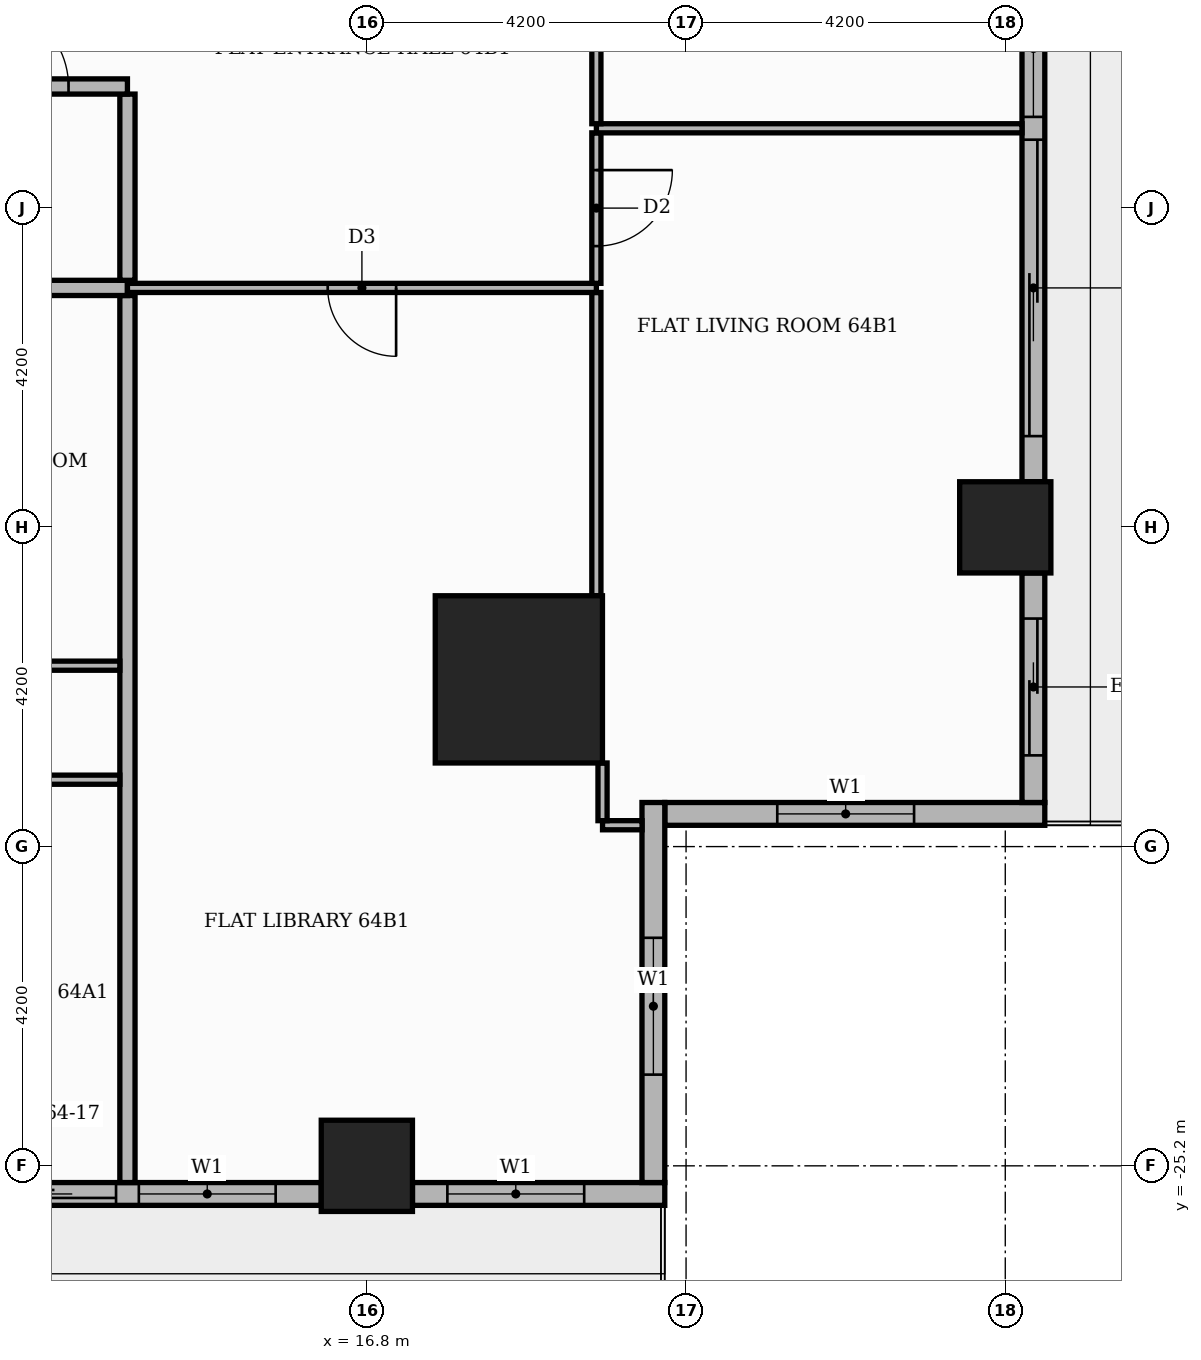
"""IFC4 building model, lengths in metres.
Left out: names, types, materials, properties, quantities, classifications, styles, units other than length and angle.
Written with IfcOpenShell. Run it as: python <this file> out.ifc"""

import sys

from ifc_helpers import new_model, si_unit, direction, frame, frame_2d, origin, origin_2d, place, context, subcontext, project, spatial, rectangle, extrude, element, fill, save


model = new_model("IFC4")
c1 = context("Model", 3, precision=1e-05, world=origin(), true_north=direction((0.0, 1.0)))
c2 = subcontext(c1, "Body", "Model", "MODEL_VIEW")
j1 = project(units=[si_unit("LENGTHUNIT", "METRE"), si_unit("PLANEANGLEUNIT", "RADIAN")], contexts=[c1])
p1 = place(None, origin())
s1 = spatial("IfcSite", under=j1, at=p1, CompositionType="ELEMENT")
p2 = place(p1, origin())
s2 = spatial("IfcBuilding", under=s1, at=p2, CompositionType="ELEMENT")
p3 = place(p2, frame((0.0, 0.0, 267.9)))
s3 = spatial("IfcBuildingStorey", under=s2, at=p3, CompositionType="ELEMENT", Elevation=267.9)
p4 = place(p3, frame((18.8, -18.8, 0.0), z_axis=(0.0, 0.0, 1.0), x_axis=(1.0, 0.0, 0.0)))
e1 = element("IfcColumn", 1, at=p4, inside=s3, PredefinedType="COLUMN", context=c2, shape_type="SweptSolid", body=[
    extrude(rectangle(XDim=2.2, YDim=2.2, at=origin_2d()), origin(), (0.0, 0.0, 1.0), 3.9),
])
for number, where, z_axis, x_axis in (
    (2, (25.2, -16.8, 0.0), (0.0, 0.0, 1.0), (1.0, 0.0, 0.0)),
    (3, (16.8, -25.2, 0.0), (0.0, 0.0, 1.0), (1.0, 0.0, 0.0)),
):
    element("IfcColumn", number, at=place(p3, frame(where, z_axis=z_axis, x_axis=x_axis)), inside=s3, PredefinedType="COLUMN", context=c2, shape_type="SweptSolid", body=[
        extrude(rectangle(XDim=1.2, YDim=1.2, at=origin_2d()), origin(), (0.0, 0.0, 1.0), 3.9),
    ])
p5 = place(p3, frame((20.72, -20.57, 0.0), z_axis=(0.0, 0.0, 1.0), x_axis=(1.0, 0.0, 0.0)))
e4 = element("IfcWall", 4, at=p5, inside=s3, PredefinedType="STANDARD", context=c2, shape_type="SweptSolid", body=[
    extrude(rectangle(XDim=5.0, YDim=0.3, at=frame_2d((2.5, 0.0))), origin(), (0.0, 0.0, 1.0), 3.48),
])
p6 = place(p5, frame((1.48, 0.0, 0.9)))
e5 = element("IfcOpeningElement", 5, at=p6, cuts=e4, PredefinedType="OPENING", context=c2, shape_type="SweptSolid", body=[
    extrude(rectangle(XDim=1.8, YDim=2.1, at=frame_2d((0.9, 1.05))), frame((0.0, 0.16, 0.0), z_axis=(0.0, -1.0, 0.0), x_axis=(1.0, 0.0, 0.0)), (0.0, 0.0, 1.0), 0.32),
])
p7 = place(p3, frame((25.57, -20.42, 0.0), z_axis=(0.0, 0.0, 1.0), x_axis=(0.0, 1.0, 0.0)))
e6 = element("IfcWall", 6, at=p7, inside=s3, PredefinedType="STANDARD", context=c2, shape_type="SweptSolid", body=[
    extrude(rectangle(XDim=3.02, YDim=0.3, at=frame_2d((1.51, 0.0))), origin(), (0.0, 0.0, 1.0), 3.48),
])
p8 = place(p7, frame((0.62, 0.0, 0.0)))
e7 = element("IfcOpeningElement", 7, at=p8, cuts=e6, PredefinedType="OPENING", context=c2, shape_type="SweptSolid", body=[
    extrude(rectangle(XDim=1.8, YDim=2.4, at=frame_2d((0.9, 1.2))), frame((0.0, 0.16, 0.0), z_axis=(0.0, -1.0, 0.0), x_axis=(1.0, 0.0, 0.0)), (0.0, 0.0, 1.0), 0.32),
])
p9 = place(p3, frame((25.57, -16.2, 0.0), z_axis=(0.0, 0.0, 1.0), x_axis=(0.0, 1.0, 0.0)))
e8 = element("IfcWall", 8, at=p9, inside=s3, PredefinedType="STANDARD", context=c2, shape_type="SweptSolid", body=[
    extrude(rectangle(XDim=7.2, YDim=0.3, at=frame_2d((3.6, 0.0))), origin(), (0.0, 0.0, 1.0), 3.48),
])
p10 = place(p9, frame((0.6, 0.0, 0.0)))
e9 = element("IfcOpeningElement", 9, at=p10, cuts=e8, PredefinedType="OPENING", context=c2, shape_type="SweptSolid", body=[
    extrude(rectangle(XDim=3.9, YDim=2.4, at=frame_2d((1.95, 1.2))), frame((0.0, 0.16, 0.0), z_axis=(0.0, -1.0, 0.0), x_axis=(1.0, 0.0, 0.0)), (0.0, 0.0, 1.0), 0.32),
])
p11 = place(p9, frame((4.8, 0.0, 0.9)))
e10 = element("IfcOpeningElement", 10, at=p11, cuts=e8, PredefinedType="OPENING", context=c2, shape_type="SweptSolid", body=[
    extrude(rectangle(XDim=1.8, YDim=2.1, at=frame_2d((0.9, 1.05))), frame((0.0, 0.16, 0.0), z_axis=(0.0, -1.0, 0.0), x_axis=(1.0, 0.0, 0.0)), (0.0, 0.0, 1.0), 0.32),
])
p12 = place(p3, frame((9.75, -25.57, 0.0), z_axis=(0.0, 0.0, 1.0), x_axis=(1.0, 0.0, 0.0)))
e11 = element("IfcWall", 11, at=p12, inside=s3, PredefinedType="STANDARD", context=c2, shape_type="SweptSolid", body=[
    extrude(rectangle(XDim=6.45, YDim=0.3, at=frame_2d((3.225, 0.0))), origin(), (0.0, 0.0, 1.0), 3.48),
])
p13 = place(p12, frame((1.95, 0.0, 0.0)))
e12 = element("IfcOpeningElement", 12, at=p13, cuts=e11, PredefinedType="OPENING", context=c2, shape_type="SweptSolid", body=[
    extrude(rectangle(XDim=1.8, YDim=2.4, at=frame_2d((0.9, 1.2))), frame((0.0, 0.16, 0.0), z_axis=(0.0, -1.0, 0.0), x_axis=(1.0, 0.0, 0.0)), (0.0, 0.0, 1.0), 0.32),
])
p14 = place(p12, frame((4.05, 0.0, 0.9)))
e13 = element("IfcOpeningElement", 13, at=p14, cuts=e11, PredefinedType="OPENING", context=c2, shape_type="SweptSolid", body=[
    extrude(rectangle(XDim=1.8, YDim=2.1, at=frame_2d((0.9, 1.05))), frame((0.0, 0.16, 0.0), z_axis=(0.0, -1.0, 0.0), x_axis=(1.0, 0.0, 0.0)), (0.0, 0.0, 1.0), 0.32),
])
p15 = place(p3, frame((17.4, -25.57, 0.0), z_axis=(0.0, 0.0, 1.0), x_axis=(1.0, 0.0, 0.0)))
e14 = element("IfcWall", 14, at=p15, inside=s3, PredefinedType="STANDARD", context=c2, shape_type="SweptSolid", body=[
    extrude(rectangle(XDim=3.32, YDim=0.3, at=frame_2d((1.66, 0.0))), origin(), (0.0, 0.0, 1.0), 3.48),
])
p16 = place(p15, frame((0.459, 0.0, 0.9)))
e15 = element("IfcOpeningElement", 15, at=p16, cuts=e14, PredefinedType="OPENING", context=c2, shape_type="SweptSolid", body=[
    extrude(rectangle(XDim=1.8, YDim=2.1, at=frame_2d((0.9, 1.05))), frame((0.0, 0.16, 0.0), z_axis=(0.0, -1.0, 0.0), x_axis=(1.0, 0.0, 0.0)), (0.0, 0.0, 1.0), 0.32),
])
p17 = place(p3, frame((20.57, -25.42, 0.0), z_axis=(0.0, 0.0, 1.0), x_axis=(0.0, 1.0, 0.0)))
e16 = element("IfcWall", 16, at=p17, inside=s3, PredefinedType="STANDARD", context=c2, shape_type="SweptSolid", body=[
    extrude(rectangle(XDim=5.0, YDim=0.3, at=frame_2d((2.5, 0.0))), origin(), (0.0, 0.0, 1.0), 3.48),
])
p18 = place(p17, frame((1.42, 0.0, 0.9)))
e17 = element("IfcOpeningElement", 17, at=p18, cuts=e16, PredefinedType="OPENING", context=c2, shape_type="SweptSolid", body=[
    extrude(rectangle(XDim=1.8, YDim=2.1, at=frame_2d((0.9, 1.05))), frame((0.0, 0.16, 0.0), z_axis=(0.0, -1.0, 0.0), x_axis=(1.0, 0.0, 0.0)), (0.0, 0.0, 1.0), 0.32),
])
p19 = place(p3, frame((13.65, -25.42, 0.0), z_axis=(0.0, 0.0, 1.0), x_axis=(0.0, 1.0, 0.0)))
e18 = element("IfcWall", 18, at=p19, inside=s3, PredefinedType="PARTITIONING", context=c2, shape_type="SweptSolid", body=[
    extrude(rectangle(XDim=11.67, YDim=0.2, at=frame_2d((5.835, 0.0))), origin(), (0.0, 0.0, 1.0), 3.48),
])
p20 = place(p3, frame((19.901, -20.719, 0.0), z_axis=(0.0, 0.0, 1.0), x_axis=(1.0, 0.0, 0.0)))
e19 = element("IfcWall", 19, at=p20, inside=s3, PredefinedType="PARTITIONING", context=c2, shape_type="SweptSolid", body=[
    extrude(rectangle(XDim=0.52, YDim=0.12, at=frame_2d((0.26, 0.0))), origin(), (0.0, 0.0, 1.0), 3.48),
])
p21 = place(p3, frame((19.901, -20.659, 0.0), z_axis=(0.0, 0.0, 1.0), x_axis=(0.0, 1.0, 0.0)))
e20 = element("IfcWall", 20, at=p21, inside=s3, PredefinedType="PARTITIONING", context=c2, shape_type="SweptSolid", body=[
    extrude(rectangle(XDim=0.759, YDim=0.12, at=frame_2d((0.379, 0.0))), origin(), (0.0, 0.0, 1.0), 3.48),
])
p22 = place(p3, frame((9.45, -20.12, 0.0), z_axis=(0.0, 0.0, 1.0), x_axis=(1.0, 0.0, 0.0)))
e21 = element("IfcWall", 21, at=p22, inside=s3, PredefinedType="PARTITIONING", context=c2, shape_type="SweptSolid", body=[
    extrude(rectangle(XDim=4.1, YDim=0.12, at=frame_2d((2.05, 0.0))), origin(), (0.0, 0.0, 1.0), 3.48),
])
p23 = place(p22, frame((1.65, 0.0, 0.0)))
e22 = element("IfcOpeningElement", 22, at=p23, cuts=e21, PredefinedType="OPENING", context=c2, shape_type="SweptSolid", body=[
    extrude(rectangle(XDim=0.9, YDim=2.1, at=frame_2d((0.45, 1.05))), frame((0.0, 0.07, 0.0), z_axis=(0.0, -1.0, 0.0), x_axis=(1.0, 0.0, 0.0)), (0.0, 0.0, 1.0), 0.14),
])
p24 = place(p3, frame((-7.35, -18.62, 0.0), z_axis=(0.0, 0.0, 1.0), x_axis=(1.0, 0.0, 0.0)))
e23 = element("IfcWall", 23, at=p24, inside=s3, PredefinedType="PARTITIONING", context=c2, shape_type="SweptSolid", body=[
    extrude(rectangle(XDim=20.9, YDim=0.12, at=frame_2d((10.45, 0.0))), origin(), (0.0, 0.0, 1.0), 3.48),
])
p25 = place(p24, frame((2.7, 0.0, 0.0)))
e24 = element("IfcOpeningElement", 24, at=p25, cuts=e23, PredefinedType="OPENING", context=c2, shape_type="SweptSolid", body=[
    extrude(rectangle(XDim=0.9, YDim=2.1, at=frame_2d((0.45, 1.05))), frame((0.0, 0.07, 0.0), z_axis=(0.0, -1.0, 0.0), x_axis=(1.0, 0.0, 0.0)), (0.0, 0.0, 1.0), 0.14),
])
p26 = place(p24, frame((7.95, 0.0, 0.0)))
e25 = element("IfcOpeningElement", 25, at=p26, cuts=e23, PredefinedType="OPENING", context=c2, shape_type="SweptSolid", body=[
    extrude(rectangle(XDim=0.9, YDim=2.1, at=frame_2d((0.45, 1.05))), frame((0.0, 0.07, 0.0), z_axis=(0.0, -1.0, 0.0), x_axis=(1.0, 0.0, 0.0)), (0.0, 0.0, 1.0), 0.14),
])
p27 = place(p24, frame((11.1, 0.0, 0.0)))
e26 = element("IfcOpeningElement", 26, at=p27, cuts=e23, PredefinedType="OPENING", context=c2, shape_type="SweptSolid", body=[
    extrude(rectangle(XDim=0.9, YDim=2.1, at=frame_2d((0.45, 1.05))), frame((0.0, 0.07, 0.0), z_axis=(0.0, -1.0, 0.0), x_axis=(1.0, 0.0, 0.0)), (0.0, 0.0, 1.0), 0.14),
])
p28 = place(p24, frame((13.275, 0.0, 0.0)))
e27 = element("IfcOpeningElement", 27, at=p28, cuts=e23, PredefinedType="OPENING", context=c2, shape_type="SweptSolid", body=[
    extrude(rectangle(XDim=0.9, YDim=2.1, at=frame_2d((0.45, 1.05))), frame((0.0, 0.07, 0.0), z_axis=(0.0, -1.0, 0.0), x_axis=(1.0, 0.0, 0.0)), (0.0, 0.0, 1.0), 0.14),
])
p29 = place(p24, frame((15.375, 0.0, 0.0)))
e28 = element("IfcOpeningElement", 28, at=p29, cuts=e23, PredefinedType="OPENING", context=c2, shape_type="SweptSolid", body=[
    extrude(rectangle(XDim=0.9, YDim=2.1, at=frame_2d((0.45, 1.05))), frame((0.0, 0.07, 0.0), z_axis=(0.0, -1.0, 0.0), x_axis=(1.0, 0.0, 0.0)), (0.0, 0.0, 1.0), 0.14),
])
p30 = place(p24, frame((18.45, 0.0, 0.0)))
e29 = element("IfcOpeningElement", 29, at=p30, cuts=e23, PredefinedType="OPENING", context=c2, shape_type="SweptSolid", body=[
    extrude(rectangle(XDim=0.9, YDim=2.1, at=frame_2d((0.45, 1.05))), frame((0.0, 0.07, 0.0), z_axis=(0.0, -1.0, 0.0), x_axis=(1.0, 0.0, 0.0)), (0.0, 0.0, 1.0), 0.14),
])
p31 = place(p3, frame((19.82, -17.7, 0.0), z_axis=(0.0, 0.0, 1.0), x_axis=(0.0, 1.0, 0.0)))
e30 = element("IfcWall", 30, at=p31, inside=s3, PredefinedType="PARTITIONING", context=c2, shape_type="SweptSolid", body=[
    extrude(rectangle(XDim=3.99, YDim=0.12, at=frame_2d((1.995, 0.0))), origin(), (0.0, 0.0, 1.0), 3.48),
])
p32 = place(p3, frame((-25.42, -13.65, 0.0), z_axis=(0.0, 0.0, 1.0), x_axis=(1.0, 0.0, 0.0)))
e31 = element("IfcWall", 31, at=p32, inside=s3, PredefinedType="PARTITIONING", context=c2, shape_type="SweptSolid", body=[
    extrude(rectangle(XDim=39.07, YDim=0.2, at=frame_2d((19.535, 0.0))), origin(), (0.0, 0.0, 1.0), 3.48),
])
p33 = place(p32, frame((14.37, 0.0, 0.0)))
e32 = element("IfcOpeningElement", 32, at=p33, cuts=e31, PredefinedType="OPENING", context=c2, shape_type="SweptSolid", body=[
    extrude(rectangle(XDim=1.1, YDim=2.4, at=frame_2d((0.55, 1.2))), frame((0.0, 0.11, 0.0), z_axis=(0.0, -1.0, 0.0), x_axis=(1.0, 0.0, 0.0)), (0.0, 0.0, 1.0), 0.22),
])
p34 = place(p3, frame((13.65, -13.65, 0.0), z_axis=(0.0, 0.0, 1.0), x_axis=(1.0, 0.0, 0.0)))
e33 = element("IfcWall", 33, at=p34, inside=s3, PredefinedType="PARTITIONING", context=c2, shape_type="SweptSolid", body=[
    extrude(rectangle(XDim=6.17, YDim=0.12, at=frame_2d((3.085, 0.0))), origin(), (0.0, 0.0, 1.0), 3.48),
])
p35 = place(p34, frame((2.635, 0.0, 0.0)))
e34 = element("IfcOpeningElement", 34, at=p35, cuts=e33, PredefinedType="OPENING", context=c2, shape_type="SweptSolid", body=[
    extrude(rectangle(XDim=0.9, YDim=2.1, at=frame_2d((0.45, 1.05))), frame((0.0, 0.07, 0.0), z_axis=(0.0, -1.0, 0.0), x_axis=(1.0, 0.0, 0.0)), (0.0, 0.0, 1.0), 0.14),
])
p36 = place(p3, frame((19.82, -13.59, 0.0), z_axis=(0.0, 0.0, 1.0), x_axis=(0.0, 1.0, 0.0)))
e35 = element("IfcWall", 35, at=p36, inside=s3, PredefinedType="PARTITIONING", context=c2, shape_type="SweptSolid", body=[
    extrude(rectangle(XDim=1.98, YDim=0.12, at=frame_2d((0.99, 0.0))), origin(), (0.0, 0.0, 1.0), 3.48),
])
p37 = place(p36, frame((0.49, 0.0, 0.0)))
e36 = element("IfcOpeningElement", 36, at=p37, cuts=e35, PredefinedType="OPENING", context=c2, shape_type="SweptSolid", body=[
    extrude(rectangle(XDim=1.0, YDim=2.1, at=frame_2d((0.5, 1.05))), frame((0.0, 0.07, 0.0), z_axis=(0.0, -1.0, 0.0), x_axis=(1.0, 0.0, 0.0)), (0.0, 0.0, 1.0), 0.14),
])
p38 = place(p3, frame((13.65, -13.55, 0.0), z_axis=(0.0, 0.0, 1.0), x_axis=(0.0, 1.0, 0.0)))
e37 = element("IfcWall", 37, at=p38, inside=s3, PredefinedType="PARTITIONING", context=c2, shape_type="SweptSolid", body=[
    extrude(rectangle(XDim=2.45, YDim=0.2, at=frame_2d((1.225, 0.0))), origin(), (0.0, 0.0, 1.0), 3.48),
])
p39 = place(p3, frame((19.82, -11.55, 0.0), z_axis=(0.0, 0.0, 1.0), x_axis=(1.0, 0.0, 0.0)))
e38 = element("IfcWall", 38, at=p39, inside=s3, PredefinedType="PARTITIONING", context=c2, shape_type="SweptSolid", body=[
    extrude(rectangle(XDim=5.6, YDim=0.12, at=frame_2d((2.8, 0.0))), origin(), (0.0, 0.0, 1.0), 3.48),
])
p40 = place(p3, frame((19.82, -11.49, 0.0), z_axis=(0.0, 0.0, 1.0), x_axis=(0.0, 1.0, 0.0)))
e39 = element("IfcWall", 39, at=p40, inside=s3, PredefinedType="PARTITIONING", context=c2, shape_type="SweptSolid", body=[
    extrude(rectangle(XDim=8.28, YDim=0.12, at=frame_2d((4.14, 0.0))), origin(), (0.0, 0.0, 1.0), 3.48),
])
p41 = place(p40, frame((3.64, 0.0, 0.0)))
e40 = element("IfcOpeningElement", 40, at=p41, cuts=e39, PredefinedType="OPENING", context=c2, shape_type="SweptSolid", body=[
    extrude(rectangle(XDim=1.0, YDim=2.1, at=frame_2d((0.5, 1.05))), frame((0.0, 0.07, 0.0), z_axis=(0.0, -1.0, 0.0), x_axis=(1.0, 0.0, 0.0)), (0.0, 0.0, 1.0), 0.14),
])
p42 = place(p3, frame((11.0, -11.0, 0.0), z_axis=(0.0, 0.0, 1.0), x_axis=(1.0, 0.0, 0.0)))
e41 = element("IfcWall", 41, at=p42, inside=s3, PredefinedType="PARTITIONING", context=c2, shape_type="SweptSolid", body=[
    extrude(rectangle(XDim=2.65, YDim=0.2, at=frame_2d((1.325, 0.0))), origin(), (0.0, 0.0, 1.0), 3.48),
])
p43 = place(p42, frame((0.775, 0.0, 0.0)))
e42 = element("IfcOpeningElement", 42, at=p43, cuts=e41, PredefinedType="OPENING", context=c2, shape_type="SweptSolid", body=[
    extrude(rectangle(XDim=1.1, YDim=2.4, at=frame_2d((0.55, 1.2))), frame((0.0, 0.11, 0.0), z_axis=(0.0, -1.0, 0.0), x_axis=(1.0, 0.0, 0.0)), (0.0, 0.0, 1.0), 0.22),
])
p44 = place(p6, origin())
e43 = element("IfcWindow", 43, at=p44, inside=s3, PartitioningType="SINGLE_PANEL", PredefinedType="WINDOW", context=c2, shape_type="SweptSolid", body=[
    extrude(rectangle(XDim=1.8, YDim=2.1, at=frame_2d((0.9, 1.05))), frame((0.0, 0.03, 0.0), z_axis=(0.0, -1.0, 0.0), x_axis=(1.0, 0.0, 0.0)), (0.0, 0.0, 1.0), 0.06),
])
fill(e5, e43)
p45 = place(p8, origin())
e44 = element("IfcDoor", 44, at=p45, inside=s3, OperationType="SLIDING_TO_RIGHT", PredefinedType="DOOR", context=c2, shape_type="SweptSolid", body=[
    extrude(rectangle(XDim=1.8, YDim=2.4, at=frame_2d((0.9, 1.2))), frame((0.0, 0.025, 0.0), z_axis=(0.0, -1.0, 0.0), x_axis=(1.0, 0.0, 0.0)), (0.0, 0.0, 1.0), 0.05),
])
fill(e7, e44)
p46 = place(p10, origin())
e45 = element("IfcDoor", 45, at=p46, inside=s3, OperationType="SLIDING_TO_LEFT", PredefinedType="DOOR", context=c2, shape_type="SweptSolid", body=[
    extrude(rectangle(XDim=3.9, YDim=2.4, at=frame_2d((1.95, 1.2))), frame((0.0, 0.025, 0.0), z_axis=(0.0, -1.0, 0.0), x_axis=(1.0, 0.0, 0.0)), (0.0, 0.0, 1.0), 0.05),
])
fill(e9, e45)
p47 = place(p11, origin())
e46 = element("IfcWindow", 46, at=p47, inside=s3, PartitioningType="SINGLE_PANEL", PredefinedType="WINDOW", context=c2, shape_type="SweptSolid", body=[
    extrude(rectangle(XDim=1.8, YDim=2.1, at=frame_2d((0.9, 1.05))), frame((0.0, 0.03, 0.0), z_axis=(0.0, -1.0, 0.0), x_axis=(1.0, 0.0, 0.0)), (0.0, 0.0, 1.0), 0.06),
])
fill(e10, e46)
p48 = place(p13, origin())
e47 = element("IfcDoor", 47, at=p48, inside=s3, OperationType="SLIDING_TO_RIGHT", PredefinedType="DOOR", context=c2, shape_type="SweptSolid", body=[
    extrude(rectangle(XDim=1.8, YDim=2.4, at=frame_2d((0.9, 1.2))), frame((0.0, 0.025, 0.0), z_axis=(0.0, -1.0, 0.0), x_axis=(1.0, 0.0, 0.0)), (0.0, 0.0, 1.0), 0.05),
])
fill(e12, e47)
p49 = place(p14, origin())
e48 = element("IfcWindow", 48, at=p49, inside=s3, PartitioningType="SINGLE_PANEL", PredefinedType="WINDOW", context=c2, shape_type="SweptSolid", body=[
    extrude(rectangle(XDim=1.8, YDim=2.1, at=frame_2d((0.9, 1.05))), frame((0.0, 0.03, 0.0), z_axis=(0.0, -1.0, 0.0), x_axis=(1.0, 0.0, 0.0)), (0.0, 0.0, 1.0), 0.06),
])
fill(e13, e48)
p50 = place(p16, origin())
e49 = element("IfcWindow", 49, at=p50, inside=s3, PartitioningType="SINGLE_PANEL", PredefinedType="WINDOW", context=c2, shape_type="SweptSolid", body=[
    extrude(rectangle(XDim=1.8, YDim=2.1, at=frame_2d((0.9, 1.05))), frame((0.0, 0.03, 0.0), z_axis=(0.0, -1.0, 0.0), x_axis=(1.0, 0.0, 0.0)), (0.0, 0.0, 1.0), 0.06),
])
fill(e15, e49)
p51 = place(p18, origin())
e50 = element("IfcWindow", 50, at=p51, inside=s3, PartitioningType="SINGLE_PANEL", PredefinedType="WINDOW", context=c2, shape_type="SweptSolid", body=[
    extrude(rectangle(XDim=1.8, YDim=2.1, at=frame_2d((0.9, 1.05))), frame((0.0, 0.03, 0.0), z_axis=(0.0, -1.0, 0.0), x_axis=(1.0, 0.0, 0.0)), (0.0, 0.0, 1.0), 0.06),
])
fill(e17, e50)
p52 = place(p43, origin())
e51 = element("IfcDoor", 51, at=p52, inside=s3, OperationType="SINGLE_SWING_LEFT", PredefinedType="DOOR", context=c2, shape_type="SweptSolid", body=[
    extrude(rectangle(XDim=1.1, YDim=2.4, at=frame_2d((0.55, 1.2))), frame((0.0, 0.025, 0.0), z_axis=(0.0, -1.0, 0.0), x_axis=(1.0, 0.0, 0.0)), (0.0, 0.0, 1.0), 0.05),
])
fill(e42, e51)
p53 = place(p35, frame((0.9, 0.0, 0.0), z_axis=(0.0, 0.0, 1.0), x_axis=(-1.0, 0.0, 0.0)))
e52 = element("IfcDoor", 52, at=p53, inside=s3, OperationType="SINGLE_SWING_RIGHT", PredefinedType="DOOR", context=c2, shape_type="SweptSolid", body=[
    extrude(rectangle(XDim=0.9, YDim=2.1, at=frame_2d((0.45, 1.05))), frame((0.0, 0.025, 0.0), z_axis=(0.0, -1.0, 0.0), x_axis=(1.0, 0.0, 0.0)), (0.0, 0.0, 1.0), 0.05),
])
fill(e34, e52)
p54 = place(p37, frame((1.0, 0.0, 0.0), z_axis=(0.0, 0.0, 1.0), x_axis=(-1.0, 0.0, 0.0)))
e53 = element("IfcDoor", 53, at=p54, inside=s3, OperationType="SINGLE_SWING_RIGHT", PredefinedType="DOOR", context=c2, shape_type="SweptSolid", body=[
    extrude(rectangle(XDim=1.0, YDim=2.1, at=frame_2d((0.5, 1.05))), frame((0.0, 0.025, 0.0), z_axis=(0.0, -1.0, 0.0), x_axis=(1.0, 0.0, 0.0)), (0.0, 0.0, 1.0), 0.05),
])
fill(e36, e53)
save(model, sys.argv[1])
